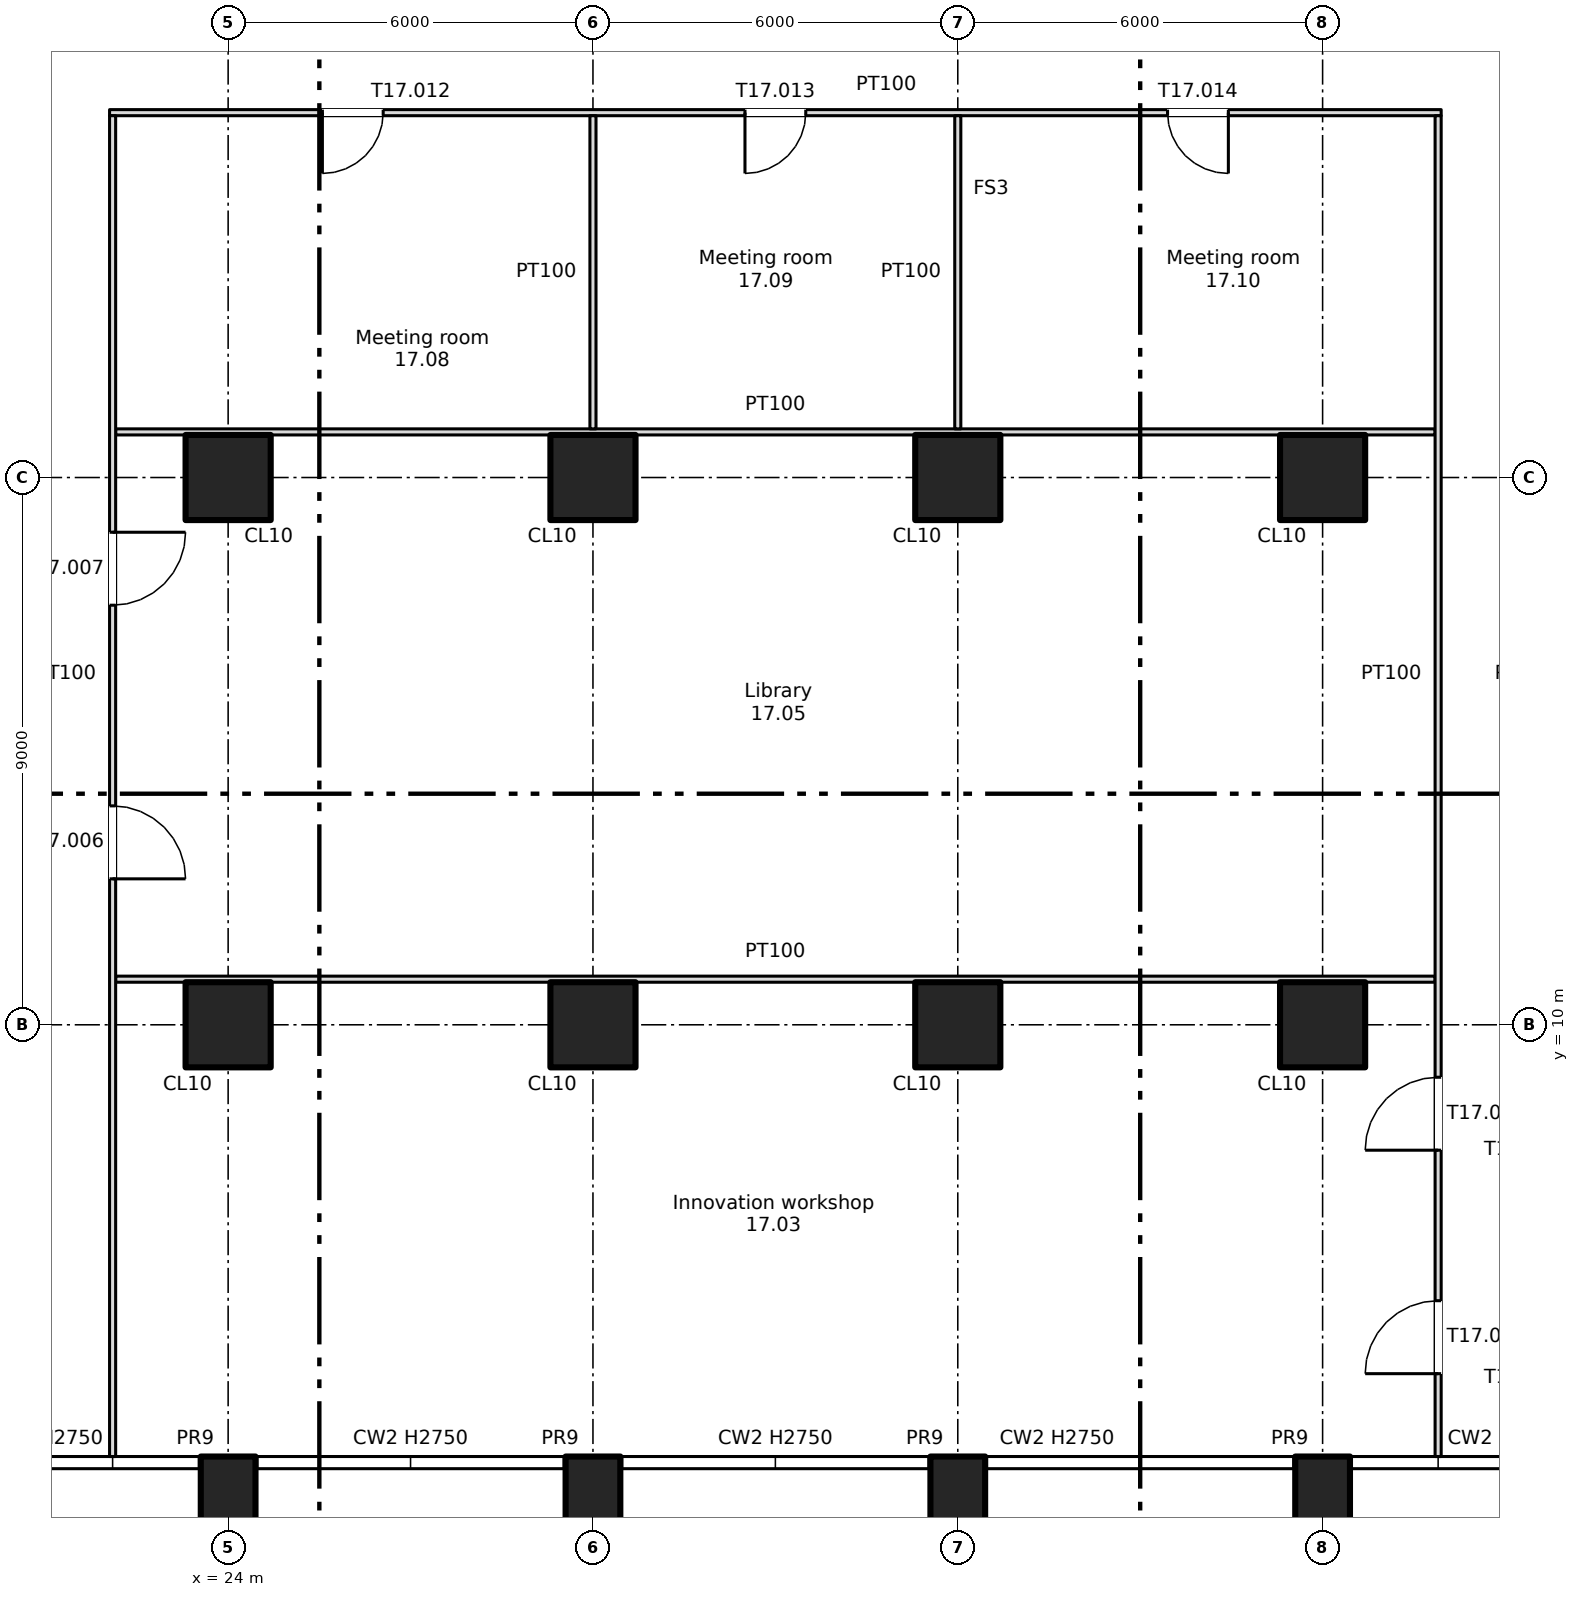
"""IFC4 building model, lengths in metres.
Left out: names, types, materials, properties, quantities, classifications, styles, units other than length and angle.
Written with IfcOpenShell. Run it as: python <this file> out.ifc"""

import sys

from ifc_helpers import new_model, si_unit, direction, frame, frame_2d, origin, origin_2d, place, context, subcontext, project, spatial, rectangle, extrude, element, fill, save


model = new_model("IFC4")
c1 = context("Model", 3, precision=1e-05, world=origin(), true_north=direction((0.0, 1.0)))
c2 = subcontext(c1, "Body", "Model", "MODEL_VIEW")
j1 = project(units=[si_unit("LENGTHUNIT", "METRE"), si_unit("PLANEANGLEUNIT", "RADIAN")], contexts=[c1])
p1 = place(None, origin())
s1 = spatial("IfcSite", under=j1, at=p1, CompositionType="ELEMENT")
p2 = place(p1, origin())
s2 = spatial("IfcBuilding", under=s1, at=p2, CompositionType="ELEMENT")
p3 = place(p2, frame((0.0, 0.0, 106.25)))
s3 = spatial("IfcBuildingStorey", under=s2, at=p3, CompositionType="ELEMENT", Elevation=106.25)
for number, where, z_axis, x_axis in (
    (1, (24.0, 2.2, -0.4), (0.0, 0.0, 1.0), (1.0, 0.0, 0.0)),
    (2, (30.0, 2.2, -0.4), (0.0, 0.0, 1.0), (1.0, 0.0, 0.0)),
    (3, (36.0, 2.2, -0.4), (0.0, 0.0, 1.0), (1.0, 0.0, 0.0)),
    (4, (42.0, 2.2, -0.4), (0.0, 0.0, 1.0), (1.0, 0.0, 0.0)),
):
    element("IfcColumn", number, at=place(p3, frame(where, z_axis=z_axis, x_axis=x_axis)), inside=s3, PredefinedType="COLUMN", context=c2, shape_type="SweptSolid", body=[
        extrude(rectangle(XDim=0.9, YDim=1.4, at=origin_2d()), origin(), (0.0, 0.0, 1.0), 3.75),
    ])
for number, where, z_axis, x_axis in (
    (5, (24.0, 10.0, 0.0), (0.0, 0.0, 1.0), (1.0, 0.0, 0.0)),
    (6, (24.0, 19.0, 0.0), (0.0, 0.0, 1.0), (1.0, 0.0, 0.0)),
    (7, (30.0, 10.0, 0.0), (0.0, 0.0, 1.0), (1.0, 0.0, 0.0)),
    (8, (30.0, 19.0, 0.0), (0.0, 0.0, 1.0), (1.0, 0.0, 0.0)),
    (9, (36.0, 10.0, 0.0), (0.0, 0.0, 1.0), (1.0, 0.0, 0.0)),
    (10, (36.0, 19.0, 0.0), (0.0, 0.0, 1.0), (1.0, 0.0, 0.0)),
    (11, (42.0, 10.0, 0.0), (0.0, 0.0, 1.0), (1.0, 0.0, 0.0)),
    (12, (42.0, 19.0, 0.0), (0.0, 0.0, 1.0), (1.0, 0.0, 0.0)),
):
    element("IfcColumn", number, at=place(p3, frame(where, z_axis=z_axis, x_axis=x_axis)), inside=s3, PredefinedType="COLUMN", context=c2, shape_type="SweptSolid", body=[
        extrude(rectangle(XDim=1.4, YDim=1.4, at=origin_2d()), origin(), (0.0, 0.0, 1.0), 3.35),
    ])
for number, where, z_axis, x_axis in (
    (13, (22.15, 10.75, 0.0), (0.0, 0.0, 1.0), (1.0, 0.0, 0.0)),
    (14, (22.15, 19.75, 0.0), (0.0, 0.0, 1.0), (1.0, 0.0, 0.0)),
):
    element("IfcWall", number, at=place(p3, frame(where, z_axis=z_axis, x_axis=x_axis)), inside=s3, PredefinedType="PARTITIONING", context=c2, shape_type="SweptSolid", body=[
        extrude(rectangle(XDim=21.7, YDim=0.1, at=frame_2d((10.85, 0.0))), origin(), (0.0, 0.0, 1.0), 3.35),
    ])
p4 = place(p3, frame((22.05, 25.0, 0.0), z_axis=(0.0, 0.0, 1.0), x_axis=(1.0, 0.0, 0.0)))
e15 = element("IfcWall", 15, at=p4, inside=s3, PredefinedType="PARTITIONING", context=c2, shape_type="SweptSolid", body=[
    extrude(rectangle(XDim=21.9, YDim=0.1, at=frame_2d((10.95, 0.0))), origin(), (0.0, 0.0, 1.0), 3.35),
])
p5 = place(p4, frame((3.5, 0.0, 0.0)))
e16 = element("IfcOpeningElement", 16, at=p5, cuts=e15, PredefinedType="OPENING", context=c2, shape_type="SweptSolid", body=[
    extrude(rectangle(XDim=1.0, YDim=2.1, at=frame_2d((0.5, 1.05))), frame((0.0, 0.06, 0.0), z_axis=(0.0, -1.0, 0.0), x_axis=(1.0, 0.0, 0.0)), (0.0, 0.0, 1.0), 0.12),
])
p6 = place(p4, frame((10.45, 0.0, 0.0)))
e17 = element("IfcOpeningElement", 17, at=p6, cuts=e15, PredefinedType="OPENING", context=c2, shape_type="SweptSolid", body=[
    extrude(rectangle(XDim=1.0, YDim=2.1, at=frame_2d((0.5, 1.05))), frame((0.0, 0.06, 0.0), z_axis=(0.0, -1.0, 0.0), x_axis=(1.0, 0.0, 0.0)), (0.0, 0.0, 1.0), 0.12),
])
p7 = place(p4, frame((17.4, 0.0, 0.0)))
e18 = element("IfcOpeningElement", 18, at=p7, cuts=e15, PredefinedType="OPENING", context=c2, shape_type="SweptSolid", body=[
    extrude(rectangle(XDim=1.0, YDim=2.1, at=frame_2d((0.5, 1.05))), frame((0.0, 0.06, 0.0), z_axis=(0.0, -1.0, 0.0), x_axis=(1.0, 0.0, 0.0)), (0.0, 0.0, 1.0), 0.12),
])
p8 = place(p3, frame((22.1, 2.9, 0.0), z_axis=(0.0, 0.0, 1.0), x_axis=(0.0, 1.0, 0.0)))
e19 = element("IfcWall", 19, at=p8, inside=s3, PredefinedType="PARTITIONING", context=c2, shape_type="SweptSolid", body=[
    extrude(rectangle(XDim=22.05, YDim=0.1, at=frame_2d((11.025, 0.0))), origin(), (0.0, 0.0, 1.0), 3.35),
])
p9 = place(p8, frame((9.5, 0.0, 0.0)))
e20 = element("IfcOpeningElement", 20, at=p9, cuts=e19, PredefinedType="OPENING", context=c2, shape_type="SweptSolid", body=[
    extrude(rectangle(XDim=1.2, YDim=2.1, at=frame_2d((0.6, 1.05))), frame((0.0, 0.06, 0.0), z_axis=(0.0, -1.0, 0.0), x_axis=(1.0, 0.0, 0.0)), (0.0, 0.0, 1.0), 0.12),
])
p10 = place(p8, frame((14.0, 0.0, 0.0)))
e21 = element("IfcOpeningElement", 21, at=p10, cuts=e19, PredefinedType="OPENING", context=c2, shape_type="SweptSolid", body=[
    extrude(rectangle(XDim=1.2, YDim=2.1, at=frame_2d((0.6, 1.05))), frame((0.0, 0.06, 0.0), z_axis=(0.0, -1.0, 0.0), x_axis=(1.0, 0.0, 0.0)), (0.0, 0.0, 1.0), 0.12),
])
for number, where, z_axis, x_axis in (
    (22, (30.0, 19.8, 0.0), (0.0, 0.0, 1.0), (0.0, 1.0, 0.0)),
    (23, (36.0, 19.8, 0.0), (0.0, 0.0, 1.0), (0.0, 1.0, 0.0)),
):
    element("IfcWall", number, at=place(p3, frame(where, z_axis=z_axis, x_axis=x_axis)), inside=s3, PredefinedType="PARTITIONING", context=c2, shape_type="SweptSolid", body=[
        extrude(rectangle(XDim=5.15, YDim=0.1, at=frame_2d((2.575, 0.0))), origin(), (0.0, 0.0, 1.0), 3.35),
    ])
p11 = place(p3, frame((43.9, 2.9, 0.0), z_axis=(0.0, 0.0, 1.0), x_axis=(0.0, 1.0, 0.0)))
e24 = element("IfcWall", 24, at=p11, inside=s3, PredefinedType="PARTITIONING", context=c2, shape_type="SweptSolid", body=[
    extrude(rectangle(XDim=22.05, YDim=0.1, at=frame_2d((11.025, 0.0))), origin(), (0.0, 0.0, 1.0), 3.35),
])
p12 = place(p11, frame((1.363, 0.0, 0.0)))
e25 = element("IfcOpeningElement", 25, at=p12, cuts=e24, PredefinedType="OPENING", context=c2, shape_type="SweptSolid", body=[
    extrude(rectangle(XDim=1.2, YDim=2.1, at=frame_2d((0.6, 1.05))), frame((0.0, 0.06, 0.0), z_axis=(0.0, -1.0, 0.0), x_axis=(1.0, 0.0, 0.0)), (0.0, 0.0, 1.0), 0.12),
])
p13 = place(p11, frame((5.038, 0.0, 0.0)))
e26 = element("IfcOpeningElement", 26, at=p13, cuts=e24, PredefinedType="OPENING", context=c2, shape_type="SweptSolid", body=[
    extrude(rectangle(XDim=1.2, YDim=2.1, at=frame_2d((0.6, 1.05))), frame((0.0, 0.06, 0.0), z_axis=(0.0, -1.0, 0.0), x_axis=(1.0, 0.0, 0.0)), (0.0, 0.0, 1.0), 0.12),
])
p14 = place(p12, origin())
e27 = element("IfcDoor", 27, at=p14, inside=s3, OperationType="SINGLE_SWING_LEFT", PredefinedType="DOOR", context=c2, shape_type="SweptSolid", body=[
    extrude(rectangle(XDim=1.2, YDim=2.1, at=frame_2d((0.6, 1.05))), frame((0.0, 0.025, 0.0), z_axis=(0.0, -1.0, 0.0), x_axis=(1.0, 0.0, 0.0)), (0.0, 0.0, 1.0), 0.05),
])
fill(e25, e27)
p15 = place(p13, origin())
e28 = element("IfcDoor", 28, at=p15, inside=s3, OperationType="SINGLE_SWING_LEFT", PredefinedType="DOOR", context=c2, shape_type="SweptSolid", body=[
    extrude(rectangle(XDim=1.2, YDim=2.1, at=frame_2d((0.6, 1.05))), frame((0.0, 0.025, 0.0), z_axis=(0.0, -1.0, 0.0), x_axis=(1.0, 0.0, 0.0)), (0.0, 0.0, 1.0), 0.05),
])
fill(e26, e28)
p16 = place(p9, origin())
e29 = element("IfcDoor", 29, at=p16, inside=s3, OperationType="SINGLE_SWING_LEFT", PredefinedType="DOOR", context=c2, shape_type="SweptSolid", body=[
    extrude(rectangle(XDim=1.2, YDim=2.1, at=frame_2d((0.6, 1.05))), frame((0.0, 0.025, 0.0), z_axis=(0.0, -1.0, 0.0), x_axis=(1.0, 0.0, 0.0)), (0.0, 0.0, 1.0), 0.05),
])
fill(e20, e29)
p17 = place(p10, origin())
e30 = element("IfcDoor", 30, at=p17, inside=s3, OperationType="SINGLE_SWING_RIGHT", PredefinedType="DOOR", context=c2, shape_type="SweptSolid", body=[
    extrude(rectangle(XDim=1.2, YDim=2.1, at=frame_2d((0.6, 1.05))), frame((0.0, 0.025, 0.0), z_axis=(0.0, -1.0, 0.0), x_axis=(1.0, 0.0, 0.0)), (0.0, 0.0, 1.0), 0.05),
])
fill(e21, e30)
p18 = place(p5, origin())
e31 = element("IfcDoor", 31, at=p18, inside=s3, OperationType="SINGLE_SWING_LEFT", PredefinedType="DOOR", context=c2, shape_type="SweptSolid", body=[
    extrude(rectangle(XDim=1.0, YDim=2.1, at=frame_2d((0.5, 1.05))), frame((0.0, 0.025, 0.0), z_axis=(0.0, -1.0, 0.0), x_axis=(1.0, 0.0, 0.0)), (0.0, 0.0, 1.0), 0.05),
])
fill(e16, e31)
p19 = place(p6, origin())
e32 = element("IfcDoor", 32, at=p19, inside=s3, OperationType="SINGLE_SWING_LEFT", PredefinedType="DOOR", context=c2, shape_type="SweptSolid", body=[
    extrude(rectangle(XDim=1.0, YDim=2.1, at=frame_2d((0.5, 1.05))), frame((0.0, 0.025, 0.0), z_axis=(0.0, -1.0, 0.0), x_axis=(1.0, 0.0, 0.0)), (0.0, 0.0, 1.0), 0.05),
])
fill(e17, e32)
p20 = place(p7, origin())
e33 = element("IfcDoor", 33, at=p20, inside=s3, OperationType="SINGLE_SWING_RIGHT", PredefinedType="DOOR", context=c2, shape_type="SweptSolid", body=[
    extrude(rectangle(XDim=1.0, YDim=2.1, at=frame_2d((0.5, 1.05))), frame((0.0, 0.025, 0.0), z_axis=(0.0, -1.0, 0.0), x_axis=(1.0, 0.0, 0.0)), (0.0, 0.0, 1.0), 0.05),
])
fill(e18, e33)
save(model, sys.argv[1])
